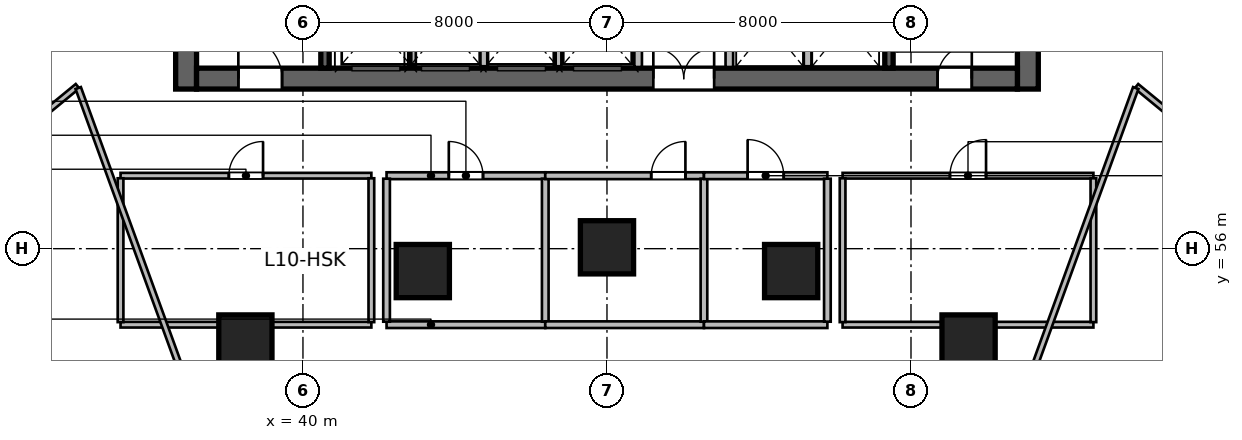
"""IFC4 building model, lengths in metres.
Left out: names, types, materials, properties, quantities, classifications, styles, units other than length and angle.
Written with IfcOpenShell. Run it as: python <this file> out.ifc"""

import sys

from ifc_helpers import new_model, si_unit, direction, frame, frame_2d, origin, origin_2d, place, context, subcontext, project, spatial, rectangle, circle, extrude, source, transform, mapped, element, fill, save


model = new_model("IFC4")
c1 = context("Model", 3, precision=1e-05, world=origin(), true_north=direction((0.0, 1.0)))
c2 = subcontext(c1, "Body", "Model", "MODEL_VIEW")
j1 = project(units=[si_unit("LENGTHUNIT", "METRE"), si_unit("PLANEANGLEUNIT", "RADIAN")], contexts=[c1])
p1 = place(None, origin())
s1 = spatial("IfcSite", under=j1, at=p1, CompositionType="ELEMENT")
p2 = place(p1, origin())
s2 = spatial("IfcBuilding", under=s1, at=p2, CompositionType="ELEMENT")
p3 = place(p2, frame((0.0, 0.0, 49.8)))
s3 = spatial("IfcBuildingStorey", under=s2, at=p3, CompositionType="ELEMENT", Elevation=49.8)
m1 = source(origin(), c2, "Body", "SweptSolid", [
    extrude(rectangle(XDim=12.0, YDim=0.55, at=frame_2d((6.0, 0.0))), origin(), (0.0, 0.0, 1.0), 3.6),
])
for number, where, z_axis, x_axis in (
    (1, (36.925, 60.2, 0.0), (0.0, 0.0, 1.0), (0.0, 1.0, 0.0)),
    (2, (59.075, 60.2, 0.0), (0.0, 0.0, 1.0), (0.0, 1.0, 0.0)),
):
    element("IfcWall", number, at=place(p3, frame(where, z_axis=z_axis, x_axis=x_axis)), inside=s3, PredefinedType="SHEAR", context=c2, shape_type="MappedRepresentation", body=[
        mapped(m1, transform((0.0, 0.0, 0.0), scale=1.0)),
    ])
m2 = source(origin(), c2, "Body", "SweptSolid", [
    extrude(rectangle(XDim=21.6, YDim=0.55, at=frame_2d((10.8, 0.0))), origin(), (0.0, 0.0, 1.0), 3.6),
])
p4 = place(p3, frame((37.2, 60.475, 0.0), z_axis=(0.0, 0.0, 1.0), x_axis=(1.0, 0.0, 0.0)))
e3 = element("IfcWall", 3, at=p4, inside=s3, PredefinedType="SHEAR", context=c2, shape_type="MappedRepresentation", body=[
    mapped(m2, transform((0.0, 0.0, 0.0), scale=1.0)),
])
p5 = place(p4, frame((1.1, 0.0, 0.0)))
e4 = element("IfcOpeningElement", 4, at=p5, cuts=e3, PredefinedType="OPENING", context=c2, shape_type="SweptSolid", body=[
    extrude(rectangle(XDim=1.15, YDim=2.15, at=frame_2d((0.575, 1.075))), frame((0.0, 0.285, 0.0), z_axis=(0.0, -1.0, 0.0), x_axis=(1.0, 0.0, 0.0)), (0.0, 0.0, 1.0), 0.57),
])
p6 = place(p4, frame((19.5, 0.0, 0.0)))
e5 = element("IfcOpeningElement", 5, at=p6, cuts=e3, PredefinedType="OPENING", context=c2, shape_type="SweptSolid", body=[
    extrude(rectangle(XDim=0.9, YDim=2.1, at=frame_2d((0.45, 1.05))), frame((0.0, 0.285, 0.0), z_axis=(0.0, -1.0, 0.0), x_axis=(1.0, 0.0, 0.0)), (0.0, 0.0, 1.0), 0.57),
])
p7 = place(p4, frame((12.02, 0.0, 0.0)))
e6 = element("IfcOpeningElement", 6, at=p7, cuts=e3, PredefinedType="OPENING", context=c2, shape_type="SweptSolid", body=[
    extrude(rectangle(XDim=1.6, YDim=2.15, at=frame_2d((0.8, 1.075))), frame((0.0, 0.285, 0.0), z_axis=(0.0, -1.0, 0.0), x_axis=(1.0, 0.0, 0.0)), (0.0, 0.0, 1.0), 0.57),
])
m3 = source(origin(), c2, "Body", "SweptSolid", [
    extrude(rectangle(XDim=10.9, YDim=0.22, at=frame_2d((5.45, 0.0))), origin(), (0.0, 0.0, 1.0), 3.6),
])
p8 = place(p3, frame((40.58, 60.75, 0.0), z_axis=(0.0, 0.0, 1.0), x_axis=(0.0, 1.0, 0.0)))
e7 = element("IfcWall", 7, at=p8, inside=s3, PredefinedType="SHEAR", context=c2, shape_type="MappedRepresentation", body=[
    mapped(m3, transform((0.0, 0.0, 0.0), scale=1.0)),
])
p9 = place(p3, frame((55.42, 60.75, 0.0), z_axis=(0.0, 0.0, 1.0), x_axis=(0.0, 1.0, 0.0)))
e8 = element("IfcWall", 8, at=p9, inside=s3, PredefinedType="SHEAR", context=c2, shape_type="MappedRepresentation", body=[
    mapped(m3, transform((0.0, 0.0, 0.0), scale=1.0)),
])
p10 = place(p9, frame((9.495, 0.0, 0.0)))
e9 = element("IfcOpeningElement", 9, at=p10, cuts=e8, PredefinedType="OPENING", context=c2, shape_type="SweptSolid", body=[
    extrude(rectangle(XDim=1.15, YDim=2.15, at=frame_2d((0.575, 1.075))), frame((0.0, 0.12, 0.0), z_axis=(0.0, -1.0, 0.0), x_axis=(1.0, 0.0, 0.0)), (0.0, 0.0, 1.0), 0.24),
])
m4 = source(origin(), c2, "Body", "SweptSolid", [
    extrude(circle(Radius=0.7, at=origin_2d()), origin(), (0.0, 0.0, 1.0), 3.6),
])
for number, where, z_axis, x_axis in (
    (10, (38.485, 53.558, 0.0), (0.0, 0.0, 1.0), (-0.289, 0.957, 0.0)),
    (11, (43.154, 55.411, 0.0), (0.0, 0.0, 1.0), (-0.143, 0.99, 0.0)),
    (12, (48.0, 56.036, 0.0), (0.0, 0.0, 1.0), (0.0, 1.0, 0.0)),
    (13, (52.846, 55.411, 0.0), (0.0, 0.0, 1.0), (0.143, 0.99, 0.0)),
    (14, (57.515, 53.558, 0.0), (0.0, 0.0, 1.0), (0.289, 0.957, 0.0)),
):
    element("IfcColumn", number, at=place(p3, frame(where, z_axis=z_axis, x_axis=x_axis)), inside=s3, PredefinedType="COLUMN", context=c2, shape_type="MappedRepresentation", body=[
        mapped(m4, transform((0.0, 0.0, 0.0), scale=1.0)),
    ])
m5 = source(origin(), c2, "Body", "SweptSolid", [
    extrude(rectangle(XDim=2.24, YDim=0.2, at=frame_2d((1.12, 0.0))), origin(), (0.0, 0.0, 1.0), 3.36),
])
for number, where, z_axis, x_axis in (
    (15, (48.82, 60.78, 0.0), (0.0, 0.0, 1.0), (0.0, 1.0, 0.0)),
    (16, (51.22, 60.78, 0.0), (0.0, 0.0, 1.0), (0.0, 1.0, 0.0)),
):
    element("IfcWall", number, at=place(p3, frame(where, z_axis=z_axis, x_axis=x_axis)), inside=s3, PredefinedType="SOLIDWALL", context=c2, shape_type="MappedRepresentation", body=[
        mapped(m5, transform((0.0, 0.0, 0.0), scale=1.0)),
    ])
m6 = source(origin(), c2, "Body", "SweptSolid", [
    extrude(rectangle(XDim=2.2, YDim=0.2, at=frame_2d((1.1, 0.0))), origin(), (0.0, 0.0, 1.0), 3.36),
])
for number, where, z_axis, x_axis in (
    (17, (42.87, 60.8, 0.0), (0.0, 0.0, 1.0), (0.0, 1.0, 0.0)),
    (18, (44.77, 60.8, 0.0), (0.0, 0.0, 1.0), (0.0, 1.0, 0.0)),
    (19, (46.7, 60.8, 0.0), (0.0, 0.0, 1.0), (0.0, 1.0, 0.0)),
    (20, (53.28, 60.8, 0.0), (0.0, 0.0, 1.0), (0.0, 1.0, 0.0)),
):
    element("IfcWall", number, at=place(p3, frame(where, z_axis=z_axis, x_axis=x_axis)), inside=s3, PredefinedType="SOLIDWALL", context=c2, shape_type="MappedRepresentation", body=[
        mapped(m6, transform((0.0, 0.0, 0.0), scale=1.0)),
    ])
m7 = source(origin(), c2, "Body", "SweptSolid", [
    extrude(rectangle(XDim=6.6, YDim=0.15, at=frame_2d((3.3, 0.0))), origin(), (0.0, 0.0, 1.0), 2.803),
])
p11 = place(p3, frame((35.2, 54.0, 0.0), z_axis=(0.0, 0.0, 1.0), x_axis=(1.0, 0.0, 0.0)))
e21 = element("IfcWall", 21, at=p11, inside=s3, PredefinedType="PARTITIONING", context=c2, shape_type="MappedRepresentation", body=[
    mapped(m7, transform((0.0, 0.0, 0.0), scale=1.0)),
])
m8 = source(origin(), c2, "Body", "SweptSolid", [
    extrude(rectangle(XDim=6.6, YDim=0.15, at=frame_2d((3.3, 0.0))), origin(), (0.0, 0.0, 1.0), 3.36),
])
p12 = place(p3, frame((35.2, 57.92, 0.0), z_axis=(0.0, 0.0, 1.0), x_axis=(1.0, 0.0, 0.0)))
e22 = element("IfcWall", 22, at=p12, inside=s3, PredefinedType="PARTITIONING", context=c2, shape_type="MappedRepresentation", body=[
    mapped(m8, transform((0.0, 0.0, 0.0), scale=1.0)),
])
p13 = place(p12, frame((2.85, 0.0, 0.0)))
e23 = element("IfcOpeningElement", 23, at=p13, cuts=e22, PredefinedType="OPENING", context=c2, shape_type="SweptSolid", body=[
    extrude(rectangle(XDim=0.9, YDim=2.1, at=frame_2d((0.45, 1.05))), frame((0.0, 0.085, 0.0), z_axis=(0.0, -1.0, 0.0), x_axis=(1.0, 0.0, 0.0)), (0.0, 0.0, 1.0), 0.17),
])
m9 = source(origin(), c2, "Body", "SweptSolid", [
    extrude(rectangle(XDim=3.785, YDim=0.15, at=frame_2d((1.893, 0.0))), origin(), (0.0, 0.0, 1.0), 3.36),
])
for number, where, z_axis, x_axis in (
    (24, (35.2, 54.067, 0.0), (0.0, 0.0, 1.0), (0.0, 1.0, 0.0)),
    (25, (41.8, 54.067, 0.0), (0.0, 0.0, 1.0), (0.0, 1.0, 0.0)),
):
    element("IfcWall", number, at=place(p3, frame(where, z_axis=z_axis, x_axis=x_axis)), inside=s3, PredefinedType="PARTITIONING", context=c2, shape_type="MappedRepresentation", body=[
        mapped(m9, transform((0.0, 0.0, 0.0), scale=1.0)),
    ])
m10 = source(origin(), c2, "Body", "SweptSolid", [
    extrude(rectangle(XDim=4.176, YDim=0.175, at=frame_2d((2.088, 0.0))), origin(), (0.0, 0.0, 1.0), 3.36),
])
p14 = place(p3, frame((42.2, 54.0, 0.0), z_axis=(0.0, 0.0, 1.0), x_axis=(1.0, 0.0, 0.0)))
e26 = element("IfcWall", 26, at=p14, inside=s3, PredefinedType="PARTITIONING", context=c2, shape_type="MappedRepresentation", body=[
    mapped(m10, transform((0.0, 0.0, 0.0), scale=1.0)),
])
m11 = source(origin(), c2, "Body", "SweptSolid", [
    extrude(rectangle(XDim=4.176, YDim=0.18, at=frame_2d((2.088, 0.0))), origin(), (0.0, 0.0, 1.0), 3.36),
])
p15 = place(p3, frame((42.2, 57.92, 0.0), z_axis=(0.0, 0.0, 1.0), x_axis=(1.0, 0.0, 0.0)))
e27 = element("IfcWall", 27, at=p15, inside=s3, PredefinedType="PLUMBINGWALL", context=c2, shape_type="MappedRepresentation", body=[
    mapped(m11, transform((0.0, 0.0, 0.0), scale=1.0)),
])
p16 = place(p15, frame((1.638, 0.0, 0.0)))
e28 = element("IfcOpeningElement", 28, at=p16, cuts=e27, PredefinedType="OPENING", context=c2, shape_type="SweptSolid", body=[
    extrude(rectangle(XDim=0.9, YDim=2.08, at=frame_2d((0.45, 1.04))), frame((0.0, 0.1, 0.0), z_axis=(0.0, -1.0, 0.0), x_axis=(1.0, 0.0, 0.0)), (0.0, 0.0, 1.0), 0.2),
])
m12 = source(origin(), c2, "Body", "SweptSolid", [
    extrude(rectangle(XDim=3.763, YDim=0.175, at=frame_2d((1.881, 0.0))), origin(), (0.0, 0.0, 1.0), 3.36),
])
for number, where, z_axis, x_axis in (
    (29, (42.2, 54.079, 0.0), (0.0, 0.0, 1.0), (0.0, 1.0, 0.0)),
    (30, (46.376, 54.079, 0.0), (0.0, 0.0, 1.0), (0.0, 1.0, 0.0)),
):
    element("IfcWall", number, at=place(p3, frame(where, z_axis=z_axis, x_axis=x_axis)), inside=s3, PredefinedType="PARTITIONING", context=c2, shape_type="MappedRepresentation", body=[
        mapped(m12, transform((0.0, 0.0, 0.0), scale=1.0)),
    ])
p17 = place(p3, frame((46.376, 54.0, 0.0), z_axis=(0.0, 0.0, 1.0), x_axis=(1.0, 0.0, 0.0)))
e31 = element("IfcWall", 31, at=p17, inside=s3, PredefinedType="PARTITIONING", context=c2, shape_type="MappedRepresentation", body=[
    mapped(m10, transform((0.0, 0.0, 0.0), scale=1.0)),
])
p18 = place(p3, frame((46.376, 57.92, 0.0), z_axis=(0.0, 0.0, 1.0), x_axis=(1.0, 0.0, 0.0)))
e32 = element("IfcWall", 32, at=p18, inside=s3, PredefinedType="PLUMBINGWALL", context=c2, shape_type="MappedRepresentation", body=[
    mapped(m11, transform((0.0, 0.0, 0.0), scale=1.0)),
])
p19 = place(p18, frame((2.788, 0.0, 0.0)))
e33 = element("IfcOpeningElement", 33, at=p19, cuts=e32, PredefinedType="OPENING", context=c2, shape_type="SweptSolid", body=[
    extrude(rectangle(XDim=0.9, YDim=2.08, at=frame_2d((0.45, 1.04))), frame((0.0, 0.1, 0.0), z_axis=(0.0, -1.0, 0.0), x_axis=(1.0, 0.0, 0.0)), (0.0, 0.0, 1.0), 0.2),
])
p20 = place(p3, frame((50.552, 54.079, 0.0), z_axis=(0.0, 0.0, 1.0), x_axis=(0.0, 1.0, 0.0)))
e34 = element("IfcWall", 34, at=p20, inside=s3, PredefinedType="PARTITIONING", context=c2, shape_type="MappedRepresentation", body=[
    mapped(m12, transform((0.0, 0.0, 0.0), scale=1.0)),
])
m13 = source(origin(), c2, "Body", "SweptSolid", [
    extrude(rectangle(XDim=3.248, YDim=0.175, at=frame_2d((1.624, 0.0))), origin(), (0.0, 0.0, 1.0), 3.36),
])
p21 = place(p3, frame((50.552, 54.0, 0.0), z_axis=(0.0, 0.0, 1.0), x_axis=(1.0, 0.0, 0.0)))
e35 = element("IfcWall", 35, at=p21, inside=s3, PredefinedType="PARTITIONING", context=c2, shape_type="MappedRepresentation", body=[
    mapped(m13, transform((0.0, 0.0, 0.0), scale=1.0)),
])
m14 = source(origin(), c2, "Body", "SweptSolid", [
    extrude(rectangle(XDim=3.248, YDim=0.18, at=frame_2d((1.624, 0.0))), origin(), (0.0, 0.0, 1.0), 3.36),
])
p22 = place(p3, frame((50.552, 57.92, 0.0), z_axis=(0.0, 0.0, 1.0), x_axis=(1.0, 0.0, 0.0)))
e36 = element("IfcWall", 36, at=p22, inside=s3, PredefinedType="PLUMBINGWALL", context=c2, shape_type="MappedRepresentation", body=[
    mapped(m14, transform((0.0, 0.0, 0.0), scale=1.0)),
])
p23 = place(p22, frame((1.149, 0.0, 0.0)))
e37 = element("IfcOpeningElement", 37, at=p23, cuts=e36, PredefinedType="OPENING", context=c2, shape_type="SweptSolid", body=[
    extrude(rectangle(XDim=0.95, YDim=2.12, at=frame_2d((0.475, 1.06))), frame((0.0, 0.1, 0.0), z_axis=(0.0, -1.0, 0.0), x_axis=(1.0, 0.0, 0.0)), (0.0, 0.0, 1.0), 0.2),
])
p24 = place(p3, frame((53.8, 54.079, 0.0), z_axis=(0.0, 0.0, 1.0), x_axis=(0.0, 1.0, 0.0)))
e38 = element("IfcWall", 38, at=p24, inside=s3, PredefinedType="PARTITIONING", context=c2, shape_type="MappedRepresentation", body=[
    mapped(m12, transform((0.0, 0.0, 0.0), scale=1.0)),
])
p25 = place(p3, frame((54.2, 54.0, 0.0), z_axis=(0.0, 0.0, 1.0), x_axis=(1.0, 0.0, 0.0)))
e39 = element("IfcWall", 39, at=p25, inside=s3, PredefinedType="PARTITIONING", context=c2, shape_type="MappedRepresentation", body=[
    mapped(m7, transform((0.0, 0.0, 0.0), scale=1.0)),
])
p26 = place(p3, frame((54.2, 57.92, 0.0), z_axis=(0.0, 0.0, 1.0), x_axis=(1.0, 0.0, 0.0)))
e40 = element("IfcWall", 40, at=p26, inside=s3, PredefinedType="PARTITIONING", context=c2, shape_type="MappedRepresentation", body=[
    mapped(m8, transform((0.0, 0.0, 0.0), scale=1.0)),
])
p27 = place(p26, frame((2.825, 0.0, 0.0)))
e41 = element("IfcOpeningElement", 41, at=p27, cuts=e40, PredefinedType="OPENING", context=c2, shape_type="SweptSolid", body=[
    extrude(rectangle(XDim=0.95, YDim=2.1, at=frame_2d((0.475, 1.05))), frame((0.0, 0.085, 0.0), z_axis=(0.0, -1.0, 0.0), x_axis=(1.0, 0.0, 0.0)), (0.0, 0.0, 1.0), 0.17),
])
for number, where, z_axis, x_axis in (
    (42, (54.2, 54.067, 0.0), (0.0, 0.0, 1.0), (0.0, 1.0, 0.0)),
    (43, (60.8, 54.067, 0.0), (0.0, 0.0, 1.0), (0.0, 1.0, 0.0)),
):
    element("IfcWall", number, at=place(p3, frame(where, z_axis=z_axis, x_axis=x_axis)), inside=s3, PredefinedType="PARTITIONING", context=c2, shape_type="MappedRepresentation", body=[
        mapped(m9, transform((0.0, 0.0, 0.0), scale=1.0)),
    ])
m15 = source(origin(), c2, "Body", "SweptSolid", [
    extrude(rectangle(XDim=6.721, YDim=0.15, at=frame_2d((3.361, 0.0))), origin(), (0.0, 0.0, 1.0), 3.36),
])
p28 = place(p3, frame((28.874, 56.01, 0.0), z_axis=(0.0, 0.0, 1.0), x_axis=(0.772828051199, 0.63461547671, 0.0)))
e44 = element("IfcWall", 44, at=p28, inside=s3, PredefinedType="PARTITIONING", context=c2, shape_type="MappedRepresentation", body=[
    mapped(m15, transform((0.0, 0.0, 0.0), scale=1.0)),
])
m16 = source(origin(), c2, "Body", "SweptSolid", [
    extrude(rectangle(XDim=12.196, YDim=0.15, at=frame_2d((6.098, 0.0))), origin(), (0.0, 0.0, 1.0), 3.36),
])
p29 = place(p3, frame((38.258, 48.766, 0.0), z_axis=(0.0, 0.0, 1.0), x_axis=(-0.342022711534, 0.939691686031, 0.0)))
e45 = element("IfcWall", 45, at=p29, inside=s3, PredefinedType="PARTITIONING", context=c2, shape_type="MappedRepresentation", body=[
    mapped(m16, transform((0.0, 0.0, 0.0), scale=1.0)),
])
p30 = place(p3, frame((61.931, 60.275, 0.0), z_axis=(0.0, 0.0, 1.0), x_axis=(0.772828051199, -0.63461547671, 0.0)))
e46 = element("IfcWall", 46, at=p30, inside=s3, PredefinedType="PARTITIONING", context=c2, shape_type="MappedRepresentation", body=[
    mapped(m15, transform((0.0, 0.0, 0.0), scale=1.0)),
])
p31 = place(p30, frame((2.66, 0.0, 0.0)))
e47 = element("IfcOpeningElement", 47, at=p31, cuts=e46, PredefinedType="OPENING", context=c2, shape_type="SweptSolid", body=[
    extrude(rectangle(XDim=1.4, YDim=2.15, at=frame_2d((0.7, 1.075))), frame((0.0, 0.085, 0.0), z_axis=(0.0, -1.0, 0.0), x_axis=(1.0, 0.0, 0.0)), (0.0, 0.0, 1.0), 0.17),
])
p32 = place(p3, frame((57.742, 48.766, 0.0), z_axis=(0.0, 0.0, 1.0), x_axis=(0.342022711534, 0.939691686031, 0.0)))
e48 = element("IfcWall", 48, at=p32, inside=s3, PredefinedType="PARTITIONING", context=c2, shape_type="MappedRepresentation", body=[
    mapped(m16, transform((0.0, 0.0, 0.0), scale=1.0)),
])
m17 = source(origin(), c2, "Body", "SweptSolid", [
    extrude(rectangle(XDim=1.15, YDim=2.15, at=frame_2d((0.575, 1.075))), frame((0.0, 0.025, 0.0), z_axis=(0.0, -1.0, 0.0), x_axis=(1.0, 0.0, 0.0)), (0.0, 0.0, 1.0), 0.05),
])
p33 = place(p5, origin())
e49 = element("IfcDoor", 49, at=p33, inside=s3, OperationType="SINGLE_SWING_LEFT", PredefinedType="DOOR", context=c2, shape_type="MappedRepresentation", body=[
    mapped(m17, transform((0.0, 0.0, 0.0), scale=1.0)),
])
fill(e4, e49)
m18 = source(origin(), c2, "Body", "SweptSolid", [
    extrude(rectangle(XDim=0.9, YDim=2.1, at=frame_2d((0.45, 1.05))), frame((0.0, 0.025, 0.0), z_axis=(0.0, -1.0, 0.0), x_axis=(1.0, 0.0, 0.0)), (0.0, 0.0, 1.0), 0.05),
])
p34 = place(p6, origin())
e50 = element("IfcDoor", 50, at=p34, inside=s3, OperationType="SINGLE_SWING_RIGHT", PredefinedType="DOOR", context=c2, shape_type="MappedRepresentation", body=[
    mapped(m18, transform((0.0, 0.0, 0.0), scale=1.0)),
])
fill(e5, e50)
m19 = source(origin(), c2, "Body", "SweptSolid", [
    extrude(rectangle(XDim=1.6, YDim=2.15, at=frame_2d((0.8, 1.075))), frame((0.0, 0.025, 0.0), z_axis=(0.0, -1.0, 0.0), x_axis=(1.0, 0.0, 0.0)), (0.0, 0.0, 1.0), 0.05),
])
p35 = place(p7, origin())
e51 = element("IfcDoor", 51, at=p35, inside=s3, OperationType="DOUBLE_DOOR_SINGLE_SWING", PredefinedType="DOOR", context=c2, shape_type="MappedRepresentation", body=[
    mapped(m19, transform((0.0, 0.0, 0.0), scale=1.0)),
])
fill(e6, e51)
p36 = place(p13, origin())
e52 = element("IfcDoor", 52, at=p36, inside=s3, OperationType="SINGLE_SWING_RIGHT", PredefinedType="DOOR", context=c2, shape_type="MappedRepresentation", body=[
    mapped(m18, transform((0.0, 0.0, 0.0), scale=1.0)),
])
fill(e23, e52)
m20 = source(origin(), c2, "Body", "SweptSolid", [
    extrude(rectangle(XDim=0.9, YDim=2.08, at=frame_2d((0.45, 1.04))), frame((0.0, 0.025, 0.0), z_axis=(0.0, -1.0, 0.0), x_axis=(1.0, 0.0, 0.0)), (0.0, 0.0, 1.0), 0.05),
])
p37 = place(p16, origin())
e53 = element("IfcDoor", 53, at=p37, inside=s3, OperationType="SINGLE_SWING_LEFT", PredefinedType="DOOR", context=c2, shape_type="MappedRepresentation", body=[
    mapped(m20, transform((0.0, 0.0, 0.0), scale=1.0)),
])
fill(e28, e53)
p38 = place(p19, origin())
e54 = element("IfcDoor", 54, at=p38, inside=s3, OperationType="SINGLE_SWING_RIGHT", PredefinedType="DOOR", context=c2, shape_type="MappedRepresentation", body=[
    mapped(m20, transform((0.0, 0.0, 0.0), scale=1.0)),
])
fill(e33, e54)
m21 = source(origin(), c2, "Body", "SweptSolid", [
    extrude(rectangle(XDim=0.95, YDim=2.12, at=frame_2d((0.475, 1.06))), frame((0.0, 0.025, 0.0), z_axis=(0.0, -1.0, 0.0), x_axis=(1.0, 0.0, 0.0)), (0.0, 0.0, 1.0), 0.05),
])
p39 = place(p23, origin())
e55 = element("IfcDoor", 55, at=p39, inside=s3, OperationType="SINGLE_SWING_LEFT", PredefinedType="DOOR", context=c2, shape_type="MappedRepresentation", body=[
    mapped(m21, transform((0.0, 0.0, 0.0), scale=1.0)),
])
fill(e37, e55)
m22 = source(origin(), c2, "Body", "SweptSolid", [
    extrude(rectangle(XDim=0.95, YDim=2.1, at=frame_2d((0.475, 1.05))), frame((0.0, 0.025, 0.0), z_axis=(0.0, -1.0, 0.0), x_axis=(1.0, 0.0, 0.0)), (0.0, 0.0, 1.0), 0.05),
])
p40 = place(p27, origin())
e56 = element("IfcDoor", 56, at=p40, inside=s3, OperationType="SINGLE_SWING_RIGHT", PredefinedType="DOOR", context=c2, shape_type="MappedRepresentation", body=[
    mapped(m22, transform((0.0, 0.0, 0.0), scale=1.0)),
])
fill(e41, e56)
save(model, sys.argv[1])
